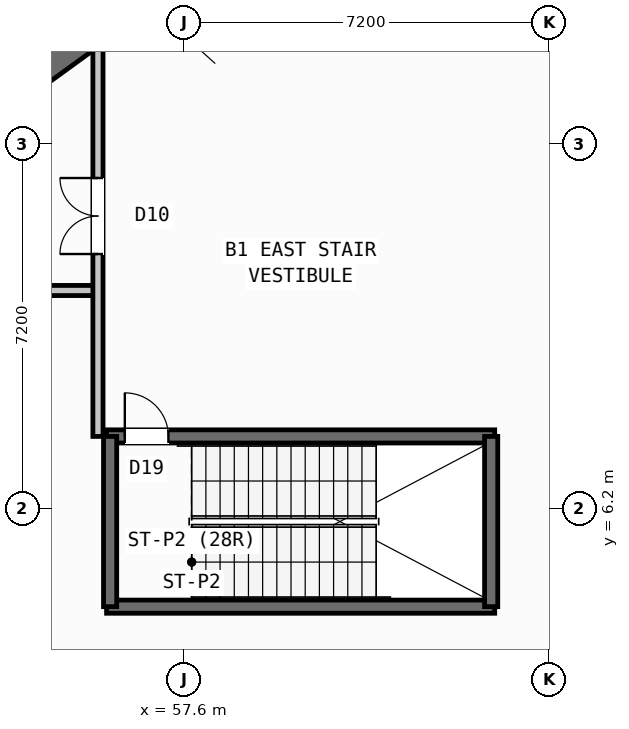
"""IFC4 building model, lengths in metres.
Left out: names, types, materials, properties, quantities, classifications, styles, units other than length and angle.
Written with IfcOpenShell. Run it as: python <this file> out.ifc"""

import sys

from ifc_helpers import new_model, si_unit, direction, frame, frame_2d, origin, place, context, subcontext, project, spatial, rectangle, extrude, source, transform, mapped, element, fill, save


model = new_model("IFC4")
c1 = context("Model", 3, precision=1e-05, world=origin(), true_north=direction((0.0, 1.0)))
c2 = subcontext(c1, "Body", "Model", "MODEL_VIEW")
j1 = project(units=[si_unit("LENGTHUNIT", "METRE"), si_unit("PLANEANGLEUNIT", "RADIAN")], contexts=[c1])
p1 = place(None, origin())
s1 = spatial("IfcSite", under=j1, at=p1, CompositionType="ELEMENT")
p2 = place(p1, origin())
s2 = spatial("IfcBuilding", under=s1, at=p2, CompositionType="ELEMENT")
p3 = place(p2, frame((0.0, 0.0, -4.8)))
s3 = spatial("IfcBuildingStorey", under=s2, at=p3, CompositionType="ELEMENT", Elevation=-4.8)
p4 = place(p3, frame((52.318, 13.11, 0.0), z_axis=(0.0, 0.0, 1.0), x_axis=(0.809019445368, 0.587781878776, 0.0)))
e1 = element("IfcWall", 1, at=p4, inside=s3, PredefinedType="SHEAR", context=c2, shape_type="SweptSolid", body=[
    extrude(rectangle(XDim=12.44, YDim=0.65, at=frame_2d((6.22, 0.0))), origin(), (0.0, 0.0, 1.0), 4.45),
])
p5 = place(p3, frame((52.472, 14.013, 0.0), z_axis=(0.0, 0.0, 1.0), x_axis=(0.809028366311, 0.587769599847, 0.0)))
e2 = element("IfcWall", 2, at=p5, inside=s3, PredefinedType="SHEAR", context=c2, shape_type="SweptSolid", body=[
    extrude(rectangle(XDim=7.33, YDim=0.26, at=frame_2d((3.665, 0.0))), origin(), (0.0, 0.0, 1.0), 4.45),
])
p6 = place(p3, frame((56.07, 7.62, 0.0), z_axis=(0.0, 0.0, 1.0), x_axis=(1.0, 0.0, 0.0)))
e3 = element("IfcWall", 3, at=p6, inside=s3, PredefinedType="SHEAR", context=c2, shape_type="SweptSolid", body=[
    extrude(rectangle(XDim=7.66, YDim=0.26, at=frame_2d((3.83, 0.0))), origin(), (0.0, 0.0, 1.0), 4.6),
])
p7 = place(p6, frame((0.36, 0.0, 0.0)))
e4 = element("IfcOpeningElement", 4, at=p7, cuts=e3, PredefinedType="OPENING", context=c2, shape_type="SweptSolid", body=[
    extrude(rectangle(XDim=0.86, YDim=2.05, at=frame_2d((0.43, 1.025))), frame((0.0, 0.14, 0.0), z_axis=(0.0, -1.0, 0.0), x_axis=(1.0, 0.0, 0.0)), (0.0, 0.0, 1.0), 0.28),
])
p8 = place(p3, frame((56.07, 4.26, 0.0), z_axis=(0.0, 0.0, 1.0), x_axis=(1.0, 0.0, 0.0)))
e5 = element("IfcWall", 5, at=p8, inside=s3, PredefinedType="SHEAR", context=c2, shape_type="SweptSolid", body=[
    extrude(rectangle(XDim=7.66, YDim=0.26, at=frame_2d((3.83, 0.0))), origin(), (0.0, 0.0, 1.0), 4.6),
])
for number, where, z_axis, x_axis in (
    (6, (56.14, 4.26, 0.0), (0.0, 0.0, 1.0), (0.0, 1.0, 0.0)),
    (7, (63.66, 4.26, 0.0), (0.0, 0.0, 1.0), (0.0, 1.0, 0.0)),
):
    element("IfcWall", number, at=place(p3, frame(where, z_axis=z_axis, x_axis=x_axis)), inside=s3, PredefinedType="SHEAR", context=c2, shape_type="SweptSolid", body=[
        extrude(rectangle(XDim=3.36, YDim=0.26, at=frame_2d((1.68, 0.0))), origin(), (0.0, 0.0, 1.0), 4.6),
    ])
p9 = place(p3, frame((31.8, 10.5, 0.0), z_axis=(0.0, 0.0, 1.0), x_axis=(1.0, 0.0, 0.0)))
e8 = element("IfcWall", 8, at=p9, inside=s3, PredefinedType="STANDARD", context=c2, shape_type="SweptSolid", body=[
    extrude(rectangle(XDim=24.1, YDim=0.2, at=frame_2d((12.05, 0.0))), origin(), (0.0, 0.0, 1.0), 4.44),
])
p10 = place(p9, frame((3.0, 0.0, 0.0)))
e9 = element("IfcOpeningElement", 9, at=p10, cuts=e8, PredefinedType="OPENING", context=c2, shape_type="SweptSolid", body=[
    extrude(rectangle(XDim=1.7, YDim=2.2, at=frame_2d((0.85, 1.1))), frame((0.0, 0.11, 0.0), z_axis=(0.0, -1.0, 0.0), x_axis=(1.0, 0.0, 0.0)), (0.0, 0.0, 1.0), 0.22),
])
p11 = place(p9, frame((15.0, 0.0, 0.0)))
e10 = element("IfcOpeningElement", 10, at=p11, cuts=e8, PredefinedType="OPENING", context=c2, shape_type="SweptSolid", body=[
    extrude(rectangle(XDim=1.3, YDim=2.15, at=frame_2d((0.65, 1.075))), frame((0.0, 0.11, 0.0), z_axis=(0.0, -1.0, 0.0), x_axis=(1.0, 0.0, 0.0)), (0.0, 0.0, 1.0), 0.22),
])
p12 = place(p3, frame((55.9, 7.62, 0.0), z_axis=(0.0, 0.0, 1.0), x_axis=(0.0, 1.0, 0.0)))
e11 = element("IfcWall", 11, at=p12, inside=s3, PredefinedType="STANDARD", context=c2, shape_type="SweptSolid", body=[
    extrude(rectangle(XDim=7.657, YDim=0.2, at=frame_2d((3.829, 0.0))), origin(), (0.0, 0.0, 1.0), 4.44),
])
p13 = place(p12, frame((3.6, 0.0, 0.0)))
e12 = element("IfcOpeningElement", 12, at=p13, cuts=e11, PredefinedType="OPENING", context=c2, shape_type="SweptSolid", body=[
    extrude(rectangle(XDim=1.5, YDim=2.15, at=frame_2d((0.75, 1.075))), frame((0.0, 0.11, 0.0), z_axis=(0.0, -1.0, 0.0), x_axis=(1.0, 0.0, 0.0)), (0.0, 0.0, 1.0), 0.22),
])
m1 = source(origin(), c2, "Body", "SweptSolid", [
    extrude(rectangle(XDim=1.5, YDim=2.15, at=frame_2d((0.75, 1.075))), frame((0.0, 0.025, 0.0), z_axis=(0.0, -1.0, 0.0), x_axis=(1.0, 0.0, 0.0)), (0.0, 0.0, 1.0), 0.05),
])
p14 = place(p13, origin())
e13 = element("IfcDoor", 13, at=p14, inside=s3, OperationType="DOUBLE_DOOR_SINGLE_SWING", PredefinedType="DOOR", context=c2, shape_type="MappedRepresentation", body=[
    mapped(m1, transform((0.0, 0.0, 0.0), scale=1.0)),
])
fill(e12, e13)
m2 = source(origin(), c2, "Body", "SweptSolid", [
    extrude(rectangle(XDim=0.86, YDim=2.05, at=frame_2d((0.43, 1.025))), frame((0.0, 0.025, 0.0), z_axis=(0.0, -1.0, 0.0), x_axis=(1.0, 0.0, 0.0)), (0.0, 0.0, 1.0), 0.05),
])
p15 = place(p7, origin())
e14 = element("IfcDoor", 14, at=p15, inside=s3, OperationType="SINGLE_SWING_LEFT", PredefinedType="DOOR", context=c2, shape_type="MappedRepresentation", body=[
    mapped(m2, transform((0.0, 0.0, 0.0), scale=1.0)),
])
fill(e4, e14)
save(model, sys.argv[1])
